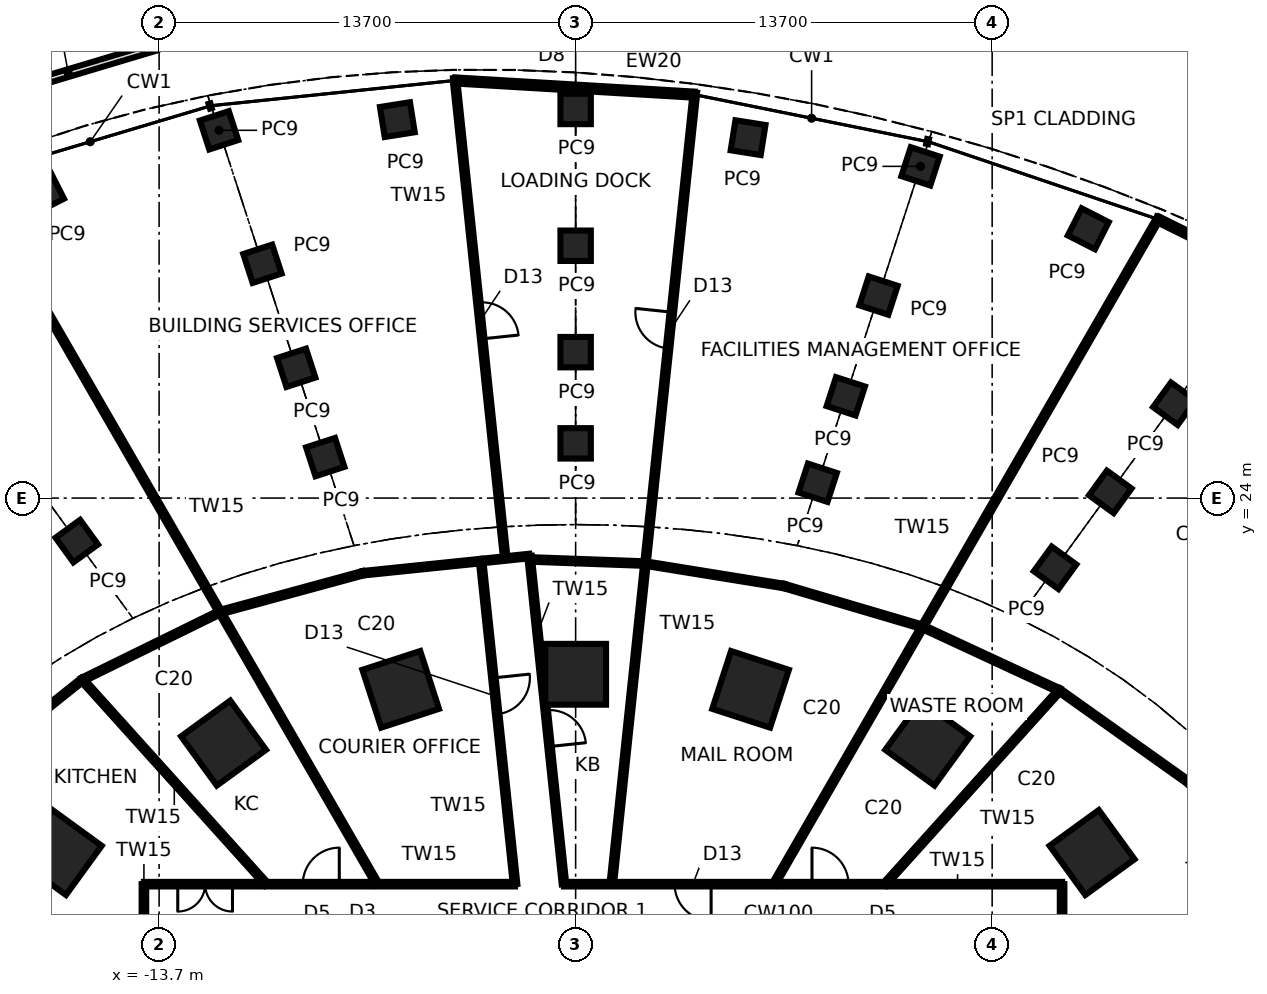
"""IFC4 building model, lengths in metres.
Left out: names, types, materials, properties, quantities, classifications, styles, units other than length and angle.
Written with IfcOpenShell. Run it as: python <this file> out.ifc"""

import sys

from ifc_helpers import new_model, si_unit, direction, frame, frame_2d, origin, origin_2d, place, context, subcontext, project, spatial, rectangle, extrude, element, fill, save


model = new_model("IFC4")
c1 = context("Model", 3, precision=1e-05, world=origin(), true_north=direction((0.0, 1.0)))
c2 = subcontext(c1, "Body", "Model", "MODEL_VIEW")
j1 = project(units=[si_unit("LENGTHUNIT", "METRE"), si_unit("PLANEANGLEUNIT", "RADIAN")], contexts=[c1])
p1 = place(None, origin())
s1 = spatial("IfcSite", under=j1, at=p1, CompositionType="ELEMENT")
p2 = place(p1, origin())
s2 = spatial("IfcBuilding", under=s1, at=p2, CompositionType="ELEMENT")
p3 = place(p2, origin())
s3 = spatial("IfcBuildingStorey", under=s2, at=p3, CompositionType="ELEMENT", Elevation=0.0)
for number, where, z_axis, x_axis in (
    (1, (16.986, 12.341, 0.0), (0.0, 0.0, 1.0), (0.809, 0.588, 0.0)),
    (2, (11.581, 15.94, 0.0), (0.0, 0.0, 1.0), (0.588, 0.809, 0.0)),
    (3, (5.754, 17.708, 0.0), (0.0, 0.0, 1.0), (0.309, 0.951, 0.0)),
    (4, (0.0, 18.204, 0.0), (0.0, 0.0, 1.0), (0.0, 1.0, 0.0)),
    (5, (-5.754, 17.708, 0.0), (0.0, 0.0, 1.0), (-0.309, 0.951, 0.0)),
    (6, (-11.581, 15.94, 0.0), (0.0, 0.0, 1.0), (-0.588, 0.809, 0.0)),
    (7, (-16.986, 12.341, 0.0), (0.0, 0.0, 1.0), (-0.809, 0.588, 0.0)),
):
    element("IfcColumn", number, at=place(p3, frame(where, z_axis=z_axis, x_axis=x_axis)), inside=s3, PredefinedType="COLUMN", context=c2, shape_type="SweptSolid", body=[
        extrude(rectangle(XDim=2.0, YDim=2.0, at=origin_2d()), origin(), (0.0, 0.0, 1.0), 5.6),
    ])
for number, where, z_axis, x_axis in (
    (8, (16.862, 32.857, 0.0), (0.0, 0.0, 1.0), (0.454, 0.891, 0.0)),
    (9, (11.344, 34.911, 0.0), (0.0, 0.0, 1.0), (0.309, 0.951, 0.0)),
    (10, (5.672, 35.856, 0.0), (0.0, 0.0, 1.0), (0.156, 0.988, 0.0)),
    (11, (0.0, 36.8, 0.0), (0.0, 0.0, 1.0), (0.0, 1.0, 0.0)),
    (12, (-5.864, 36.449, 0.0), (0.0, 0.0, 1.0), (-0.156, 0.988, 0.0)),
    (13, (-11.729, 36.097, 0.0), (0.0, 0.0, 1.0), (-0.309, 0.951, 0.0)),
    (14, (-17.502, 34.066, 0.0), (0.0, 0.0, 1.0), (-0.454, 0.891, 0.0)),
    (15, (19.692, 27.103, 0.0), (0.0, 0.0, 1.0), (0.588, 0.809, 0.0)),
    (16, (9.962, 30.66, 0.0), (0.0, 0.0, 1.0), (0.309, 0.951, 0.0)),
    (17, (0.0, 32.3, 0.0), (0.0, 0.0, 1.0), (0.0, 1.0, 0.0)),
    (18, (-10.302, 31.706, 0.0), (0.0, 0.0, 1.0), (-0.309, 0.951, 0.0)),
    (19, (17.585, 24.204, 0.0), (0.0, 0.0, 1.0), (0.588, 0.809, 0.0)),
    (20, (8.886, 27.347, 0.0), (0.0, 0.0, 1.0), (0.309, 0.951, 0.0)),
    (21, (0.0, 28.8, 0.0), (0.0, 0.0, 1.0), (0.0, 1.0, 0.0)),
    (22, (-9.19, 28.285, 0.0), (0.0, 0.0, 1.0), (-0.309, 0.951, 0.0)),
    (23, (15.77, 21.705, 0.0), (0.0, 0.0, 1.0), (0.588, 0.809, 0.0)),
    (24, (7.962, 24.504, 0.0), (0.0, 0.0, 1.0), (0.309, 0.951, 0.0)),
    (25, (0.0, 25.8, 0.0), (0.0, 0.0, 1.0), (0.0, 1.0, 0.0)),
    (26, (-8.236, 25.347, 0.0), (0.0, 0.0, 1.0), (-0.309, 0.951, 0.0)),
    (27, (-16.409, 22.584, 0.0), (0.0, 0.0, 1.0), (-0.588, 0.809, 0.0)),
):
    element("IfcColumn", number, at=place(p3, frame(where, z_axis=z_axis, x_axis=x_axis)), inside=s3, PredefinedType="COLUMN", context=c2, shape_type="SweptSolid", body=[
        extrude(rectangle(XDim=1.0, YDim=1.0, at=origin_2d()), origin(), (0.0, 0.0, 1.0), 5.6),
    ])
p4 = place(p3, frame((26.562, 29.5, 0.0), z_axis=(0.0, 0.0, 1.0), x_axis=(-0.896091912652, 0.443868543693, 0.0)))
e28 = element("IfcWall", 28, at=p4, inside=s3, PredefinedType="SOLIDWALL", context=c2, shape_type="SweptSolid", body=[
    extrude(rectangle(XDim=8.27, YDim=0.2, at=frame_2d((4.135, 0.0))), origin(), (0.0, 0.0, 1.0), 5.4),
])
p5 = place(p4, frame((0.4, 0.0, 0.0)))
e29 = element("IfcOpeningElement", 29, at=p5, cuts=e28, PredefinedType="OPENING", context=c2, shape_type="SweptSolid", body=[
    extrude(rectangle(XDim=1.8, YDim=2.7, at=frame_2d((0.9, 1.35))), frame((0.0, 0.11, 0.0), z_axis=(0.0, -1.0, 0.0), x_axis=(1.0, 0.0, 0.0)), (0.0, 0.0, 1.0), 0.22),
])
p6 = place(p3, frame((3.917, 37.269, 0.0), z_axis=(0.0, 0.0, 1.0), x_axis=(-0.998244288685, 0.059231242672, 0.0)))
e30 = element("IfcWall", 30, at=p6, inside=s3, PredefinedType="SOLIDWALL", context=c2, shape_type="SweptSolid", body=[
    extrude(rectangle(XDim=7.897, YDim=0.2, at=frame_2d((3.949, 0.0))), origin(), (0.0, 0.0, 1.0), 5.4),
])
p7 = place(p6, frame((2.972, 0.0, 0.0)))
e31 = element("IfcOpeningElement", 31, at=p7, cuts=e30, PredefinedType="OPENING", context=c2, shape_type="SweptSolid", body=[
    extrude(rectangle(XDim=3.6, YDim=4.0, at=frame_2d((1.8, 2.0))), frame((0.0, 0.11, 0.0), z_axis=(0.0, -1.0, 0.0), x_axis=(1.0, 0.0, 0.0)), (0.0, 0.0, 1.0), 0.22),
])
p8 = place(p3, frame((-13.814, 38.839, -0.15), z_axis=(0.0, 0.0, 1.0), x_axis=(-0.958018696907, -0.286705731329, 0.0)))
e32 = element("IfcWall", 32, at=p8, inside=s3, PredefinedType="SOLIDWALL", context=c2, shape_type="SweptSolid", body=[
    extrude(rectangle(XDim=6.0, YDim=0.25, at=frame_2d((3.0, 0.0))), origin(), (0.0, 0.0, 1.0), 0.6),
])
p9 = place(p3, frame((-14.237, 40.252, -0.15), z_axis=(0.0, 0.0, 1.0), x_axis=(-0.958018696907, -0.286705731329, 0.0)))
e33 = element("IfcWall", 33, at=p9, inside=s3, PredefinedType="SOLIDWALL", context=c2, shape_type="SweptSolid", body=[
    extrude(rectangle(XDim=6.0, YDim=0.4, at=frame_2d((3.0, 0.0))), origin(), (0.0, 0.0, 1.0), 0.6),
])
p10 = place(p3, frame((16.0, 3.401, 0.0), z_axis=(0.0, 0.0, 1.0), x_axis=(0.0, 1.0, 0.0)))
e34 = element("IfcWall", 34, at=p10, inside=s3, PredefinedType="PARTITIONING", context=c2, shape_type="SweptSolid", body=[
    extrude(rectangle(XDim=7.899, YDim=0.15, at=frame_2d((3.95, 0.0))), origin(), (0.0, 0.0, 1.0), 5.4),
])
p11 = place(p10, frame((3.375, 0.0, 0.0)))
e35 = element("IfcOpeningElement", 35, at=p11, cuts=e34, PredefinedType="OPENING", context=c2, shape_type="SweptSolid", body=[
    extrude(rectangle(XDim=1.2, YDim=2.4, at=frame_2d((0.6, 1.2))), frame((0.0, 0.085, 0.0), z_axis=(0.0, -1.0, 0.0), x_axis=(1.0, 0.0, 0.0)), (0.0, 0.0, 1.0), 0.17),
])
p12 = place(p3, frame((23.76, 10.579, 0.0), z_axis=(0.0, 0.0, 1.0), x_axis=(-0.661972392396, 0.749528219419, 0.0)))
e36 = element("IfcWall", 36, at=p12, inside=s3, PredefinedType="PARTITIONING", context=c2, shape_type="SweptSolid", body=[
    extrude(rectangle(XDim=5.432, YDim=0.15, at=frame_2d((2.716, 0.0))), origin(), (0.0, 0.0, 1.0), 5.4),
])
p13 = place(p3, frame((20.164, 14.65, 0.0), z_axis=(0.0, 0.0, 1.0), x_axis=(-0.81494599189, 0.579536910215, 0.0)))
e37 = element("IfcWall", 37, at=p13, inside=s3, PredefinedType="PARTITIONING", context=c2, shape_type="SweptSolid", body=[
    extrude(rectangle(XDim=5.217, YDim=0.15, at=frame_2d((2.608, 0.0))), origin(), (0.0, 0.0, 1.0), 5.4),
])
p14 = place(p3, frame((10.175, 11.3, 0.0), z_axis=(0.0, 0.0, 1.0), x_axis=(0.669128292476, 0.7431469089, 0.0)))
e38 = element("IfcWall", 38, at=p14, inside=s3, PredefinedType="PARTITIONING", context=c2, shape_type="SweptSolid", body=[
    extrude(rectangle(XDim=8.576, YDim=0.15, at=frame_2d((4.288, 0.0))), origin(), (0.0, 0.0, 1.0), 5.4),
])
p15 = place(p3, frame((15.913, 17.673, 0.0), z_axis=(0.0, 0.0, 1.0), x_axis=(-0.907108234971, 0.420897434119, 0.0)))
e39 = element("IfcWall", 39, at=p15, inside=s3, PredefinedType="PARTITIONING", context=c2, shape_type="SweptSolid", body=[
    extrude(rectangle(XDim=4.964, YDim=0.15, at=frame_2d((2.482, 0.0))), origin(), (0.0, 0.0, 1.0), 5.4),
])
p16 = place(p3, frame((16.0, 11.3, 0.0), z_axis=(0.0, 0.0, 1.0), x_axis=(-1.0, 0.0, 0.0)))
e40 = element("IfcWall", 40, at=p16, inside=s3, PredefinedType="PARTITIONING", context=c2, shape_type="SweptSolid", body=[
    extrude(rectangle(XDim=16.383, YDim=0.15, at=frame_2d((8.192, 0.0))), origin(), (0.0, 0.0, 1.0), 5.4),
])
p17 = place(p16, frame((7.026, 0.0, 0.0)))
e41 = element("IfcOpeningElement", 41, at=p17, cuts=e40, PredefinedType="OPENING", context=c2, shape_type="SweptSolid", body=[
    extrude(rectangle(XDim=1.2, YDim=2.4, at=frame_2d((0.6, 1.2))), frame((0.0, 0.085, 0.0), z_axis=(0.0, -1.0, 0.0), x_axis=(1.0, 0.0, 0.0)), (0.0, 0.0, 1.0), 0.17),
])
p18 = place(p16, frame((11.544, 0.0, 0.0)))
e42 = element("IfcOpeningElement", 42, at=p18, cuts=e40, PredefinedType="OPENING", context=c2, shape_type="SweptSolid", body=[
    extrude(rectangle(XDim=1.2, YDim=2.4, at=frame_2d((0.6, 1.2))), frame((0.0, 0.085, 0.0), z_axis=(0.0, -1.0, 0.0), x_axis=(1.0, 0.0, 0.0)), (0.0, 0.0, 1.0), 0.17),
])
p19 = place(p3, frame((6.524, 11.3, 0.0), z_axis=(0.0, 0.0, 1.0), x_axis=(0.499998368249, 0.866026345874, 0.0)))
e43 = element("IfcWall", 43, at=p19, inside=s3, PredefinedType="PARTITIONING", context=c2, shape_type="SweptSolid", body=[
    extrude(rectangle(XDim=25.174, YDim=0.15, at=frame_2d((12.587, 0.0))), origin(), (0.0, 0.0, 1.0), 5.4),
])
p20 = place(p3, frame((11.41, 19.762, 0.0), z_axis=(0.0, 0.0, 1.0), x_axis=(-0.959084076189, 0.283121413534, 0.0)))
e44 = element("IfcWall", 44, at=p20, inside=s3, PredefinedType="PARTITIONING", context=c2, shape_type="SweptSolid", body=[
    extrude(rectangle(XDim=4.746, YDim=0.15, at=frame_2d((2.373, 0.0))), origin(), (0.0, 0.0, 1.0), 5.4),
])
p21 = place(p3, frame((6.858, 21.106, 0.0), z_axis=(0.0, 0.0, 1.0), x_axis=(-0.98714853178, 0.159805432336, 0.0)))
e45 = element("IfcWall", 45, at=p21, inside=s3, PredefinedType="PARTITIONING", context=c2, shape_type="SweptSolid", body=[
    extrude(rectangle(XDim=4.621, YDim=0.15, at=frame_2d((2.311, 0.0))), origin(), (0.0, 0.0, 1.0), 5.4),
])
p22 = place(p3, frame((1.188, 11.3, 0.0), z_axis=(0.0, 0.0, 1.0), x_axis=(0.104522215703, 0.994522551994, 0.0)))
e46 = element("IfcWall", 46, at=p22, inside=s3, PredefinedType="PARTITIONING", context=c2, shape_type="SweptSolid", body=[
    extrude(rectangle(XDim=26.032, YDim=0.15, at=frame_2d((13.016, 0.0))), origin(), (0.0, 0.0, 1.0), 5.4),
])
p23 = place(p22, frame((17.718, 0.0, 0.0)))
e47 = element("IfcOpeningElement", 47, at=p23, cuts=e46, PredefinedType="OPENING", context=c2, shape_type="SweptSolid", body=[
    extrude(rectangle(XDim=1.2, YDim=2.4, at=frame_2d((0.6, 1.2))), frame((0.0, 0.085, 0.0), z_axis=(0.0, -1.0, 0.0), x_axis=(1.0, 0.0, 0.0)), (0.0, 0.0, 1.0), 0.17),
])
p24 = place(p3, frame((2.296, 21.845, 0.0), z_axis=(0.0, 0.0, 1.0), x_axis=(-0.999349376357, 0.036066937421, 0.0)))
e48 = element("IfcWall", 48, at=p24, inside=s3, PredefinedType="PARTITIONING", context=c2, shape_type="SweptSolid", body=[
    extrude(rectangle(XDim=3.804, YDim=0.15, at=frame_2d((1.902, 0.0))), origin(), (0.0, 0.0, 1.0), 5.4),
])
p25 = place(p3, frame((-0.383, 11.3, 0.0), z_axis=(0.0, 0.0, 1.0), x_axis=(-0.104514398363, 0.994523373549, 0.0)))
e49 = element("IfcWall", 49, at=p25, inside=s3, PredefinedType="PARTITIONING", context=c2, shape_type="SweptSolid", body=[
    extrude(rectangle(XDim=10.741, YDim=0.15, at=frame_2d((5.37, 0.0))), origin(), (0.0, 0.0, 1.0), 5.4),
])
p26 = place(p25, frame((4.552, 0.0, 0.0)))
e50 = element("IfcOpeningElement", 50, at=p26, cuts=e49, PredefinedType="OPENING", context=c2, shape_type="SweptSolid", body=[
    extrude(rectangle(XDim=1.2, YDim=2.4, at=frame_2d((0.6, 1.2))), frame((0.0, 0.085, 0.0), z_axis=(0.0, -1.0, 0.0), x_axis=(1.0, 0.0, 0.0)), (0.0, 0.0, 1.0), 0.17),
])
p27 = place(p3, frame((-1.506, 21.982, 0.0), z_axis=(0.0, 0.0, 1.0), x_axis=(-0.105469062013, 0.994422584698, 0.0)))
e51 = element("IfcWall", 51, at=p27, inside=s3, PredefinedType="PARTITIONING", context=c2, shape_type="SweptSolid", body=[
    extrude(rectangle(XDim=0.114, YDim=0.15, at=frame_2d((0.057, 0.0))), origin(), (0.0, 0.0, 1.0), 5.4),
])
p28 = place(p3, frame((-1.518, 22.095, 0.0), z_axis=(0.0, 0.0, 1.0), x_axis=(-0.994522996201, -0.104517989015, 0.0)))
e52 = element("IfcWall", 52, at=p28, inside=s3, PredefinedType="PARTITIONING", context=c2, shape_type="SweptSolid", body=[
    extrude(rectangle(XDim=1.6, YDim=0.15, at=frame_2d((0.8, 0.0))), origin(), (0.0, 0.0, 1.0), 5.4),
])
p29 = place(p3, frame((-2.313, 22.011, 0.0), z_axis=(0.0, 0.0, 1.0), x_axis=(-0.104529687623, 0.994521766683, 0.0)))
e53 = element("IfcWall", 53, at=p29, inside=s3, PredefinedType="PARTITIONING", context=c2, shape_type="SweptSolid", body=[
    extrude(rectangle(XDim=15.733, YDim=0.15, at=frame_2d((7.866, 0.0))), origin(), (0.0, 0.0, 1.0), 5.4),
])
p30 = place(p29, frame((7.266, 0.0, 0.0)))
e54 = element("IfcOpeningElement", 54, at=p30, cuts=e53, PredefinedType="OPENING", context=c2, shape_type="SweptSolid", body=[
    extrude(rectangle(XDim=1.2, YDim=2.4, at=frame_2d((0.6, 1.2))), frame((0.0, 0.085, 0.0), z_axis=(0.0, -1.0, 0.0), x_axis=(1.0, 0.0, 0.0)), (0.0, 0.0, 1.0), 0.17),
])
p31 = place(p3, frame((-3.109, 21.927, 0.0), z_axis=(0.0, 0.0, 1.0), x_axis=(0.104524229431, -0.994522340353, 0.0)))
e55 = element("IfcWall", 55, at=p31, inside=s3, PredefinedType="PARTITIONING", context=c2, shape_type="SweptSolid", body=[
    extrude(rectangle(XDim=10.686, YDim=0.15, at=frame_2d((5.343, 0.0))), origin(), (0.0, 0.0, 1.0), 5.4),
])
p32 = place(p31, frame((3.864, 0.0, 0.0)))
e56 = element("IfcOpeningElement", 56, at=p32, cuts=e55, PredefinedType="OPENING", context=c2, shape_type="SweptSolid", body=[
    extrude(rectangle(XDim=1.2, YDim=2.4, at=frame_2d((0.6, 1.2))), frame((0.0, 0.085, 0.0), z_axis=(0.0, -1.0, 0.0), x_axis=(1.0, 0.0, 0.0)), (0.0, 0.0, 1.0), 0.17),
])
p33 = place(p3, frame((-3.109, 21.929, 0.0), z_axis=(0.0, 0.0, 1.0), x_axis=(-0.994719772575, -0.102628329662, 0.0)))
e57 = element("IfcWall", 57, at=p33, inside=s3, PredefinedType="PARTITIONING", context=c2, shape_type="SweptSolid", body=[
    extrude(rectangle(XDim=3.906, YDim=0.15, at=frame_2d((1.953, 0.0))), origin(), (0.0, 0.0, 1.0), 5.4),
])
p34 = place(p3, frame((-6.995, 21.528, 0.0), z_axis=(0.0, 0.0, 1.0), x_axis=(-0.964877176163, -0.26270141781, 0.0)))
e58 = element("IfcWall", 58, at=p34, inside=s3, PredefinedType="PARTITIONING", context=c2, shape_type="SweptSolid", body=[
    extrude(rectangle(XDim=4.867, YDim=0.15, at=frame_2d((2.434, 0.0))), origin(), (0.0, 0.0, 1.0), 5.4),
])
p35 = place(p3, frame((-6.524, 11.3, 0.0), z_axis=(0.0, 0.0, 1.0), x_axis=(-0.499999476762, 0.866025705876, 0.0)))
e59 = element("IfcWall", 59, at=p35, inside=s3, PredefinedType="PARTITIONING", context=c2, shape_type="SweptSolid", body=[
    extrude(rectangle(XDim=26.751, YDim=0.15, at=frame_2d((13.376, 0.0))), origin(), (0.0, 0.0, 1.0), 5.4),
])
p36 = place(p3, frame((-1.992, 11.3, 0.0), z_axis=(0.0, 0.0, 1.0), x_axis=(-1.0, 0.0, 0.0)))
e60 = element("IfcWall", 60, at=p36, inside=s3, PredefinedType="PARTITIONING", context=c2, shape_type="SweptSolid", body=[
    extrude(rectangle(XDim=12.208, YDim=0.15, at=frame_2d((6.104, 0.0))), origin(), (0.0, 0.0, 1.0), 5.4),
])
p37 = place(p36, frame((5.782, 0.0, 0.0)))
e61 = element("IfcOpeningElement", 61, at=p37, cuts=e60, PredefinedType="OPENING", context=c2, shape_type="SweptSolid", body=[
    extrude(rectangle(XDim=1.2, YDim=2.4, at=frame_2d((0.6, 1.2))), frame((0.0, 0.085, 0.0), z_axis=(0.0, -1.0, 0.0), x_axis=(1.0, 0.0, 0.0)), (0.0, 0.0, 1.0), 0.17),
])
p38 = place(p36, frame((9.295, 0.0, 0.0)))
e62 = element("IfcOpeningElement", 62, at=p38, cuts=e60, PredefinedType="OPENING", context=c2, shape_type="SweptSolid", body=[
    extrude(rectangle(XDim=1.8, YDim=2.4, at=frame_2d((0.9, 1.2))), frame((0.0, 0.085, 0.0), z_axis=(0.0, -1.0, 0.0), x_axis=(1.0, 0.0, 0.0)), (0.0, 0.0, 1.0), 0.17),
])
p39 = place(p3, frame((-11.691, 20.25, 0.0), z_axis=(0.0, 0.0, 1.0), x_axis=(-0.897697488604, -0.440612322744, 0.0)))
e63 = element("IfcWall", 63, at=p39, inside=s3, PredefinedType="PARTITIONING", context=c2, shape_type="SweptSolid", body=[
    extrude(rectangle(XDim=5.054, YDim=0.15, at=frame_2d((2.527, 0.0))), origin(), (0.0, 0.0, 1.0), 5.4),
])
p40 = place(p3, frame((-10.175, 11.3, 0.0), z_axis=(0.0, 0.0, 1.0), x_axis=(-0.669137674556, 0.743138461183, 0.0)))
e64 = element("IfcWall", 64, at=p40, inside=s3, PredefinedType="PARTITIONING", context=c2, shape_type="SweptSolid", body=[
    extrude(rectangle(XDim=9.046, YDim=0.15, at=frame_2d((4.523, 0.0))), origin(), (0.0, 0.0, 1.0), 5.4),
])
p41 = place(p3, frame((-16.228, 18.023, 0.0), z_axis=(0.0, 0.0, 1.0), x_axis=(-0.781542390833, -0.623852138997, 0.0)))
e65 = element("IfcWall", 65, at=p41, inside=s3, PredefinedType="PARTITIONING", context=c2, shape_type="SweptSolid", body=[
    extrude(rectangle(XDim=5.23, YDim=0.15, at=frame_2d((2.615, 0.0))), origin(), (0.0, 0.0, 1.0), 5.4),
])
p42 = place(p3, frame((-14.2, 11.3, 0.0), z_axis=(0.0, 0.0, 1.0), x_axis=(0.0, -1.0, 0.0)))
e66 = element("IfcWall", 66, at=p42, inside=s3, PredefinedType="PARTITIONING", context=c2, shape_type="SweptSolid", body=[
    extrude(rectangle(XDim=1.8, YDim=0.15, at=frame_2d((0.9, 0.0))), origin(), (0.0, 0.0, 1.0), 5.4),
])
p43 = place(p3, frame((-14.2, 7.8, 0.0), z_axis=(0.0, 0.0, 1.0), x_axis=(-0.961010848489, 0.27651066722, 0.0)))
e67 = element("IfcWall", 67, at=p43, inside=s3, PredefinedType="SOLIDWALL", context=c2, shape_type="SweptSolid", body=[
    extrude(rectangle(XDim=9.763, YDim=0.19, at=frame_2d((4.882, 0.0))), origin(), (0.0, 0.0, 1.0), 5.4),
])
p44 = place(p7, origin())
e68 = element("IfcDoor", 68, at=p44, inside=s3, OperationType="ROLLINGUP", PredefinedType="DOOR", context=c2, shape_type="SweptSolid", body=[
    extrude(rectangle(XDim=3.6, YDim=4.0, at=frame_2d((1.8, 2.0))), frame((0.0, 0.025, 0.0), z_axis=(0.0, -1.0, 0.0), x_axis=(1.0, 0.0, 0.0)), (0.0, 0.0, 1.0), 0.05),
])
fill(e31, e68)
p45 = place(p23, origin())
e69 = element("IfcDoor", 69, at=p45, inside=s3, OperationType="SINGLE_SWING_RIGHT", PredefinedType="DOOR", context=c2, shape_type="SweptSolid", body=[
    extrude(rectangle(XDim=1.2, YDim=2.4, at=frame_2d((0.6, 1.2))), frame((0.0, 0.025, 0.0), z_axis=(0.0, -1.0, 0.0), x_axis=(1.0, 0.0, 0.0)), (0.0, 0.0, 1.0), 0.05),
])
fill(e47, e69)
p46 = place(p30, frame((1.2, 0.0, 0.0), z_axis=(0.0, 0.0, 1.0), x_axis=(-1.0, 0.0, 0.0)))
e70 = element("IfcDoor", 70, at=p46, inside=s3, OperationType="SINGLE_SWING_RIGHT", PredefinedType="DOOR", context=c2, shape_type="SweptSolid", body=[
    extrude(rectangle(XDim=1.2, YDim=2.4, at=frame_2d((0.6, 1.2))), frame((0.0, 0.025, 0.0), z_axis=(0.0, -1.0, 0.0), x_axis=(1.0, 0.0, 0.0)), (0.0, 0.0, 1.0), 0.05),
])
fill(e54, e70)
p47 = place(p17, frame((1.2, 0.0, 0.0), z_axis=(0.0, 0.0, 1.0), x_axis=(-1.0, 0.0, 0.0)))
e71 = element("IfcDoor", 71, at=p47, inside=s3, OperationType="SINGLE_SWING_LEFT", PredefinedType="DOOR", context=c2, shape_type="SweptSolid", body=[
    extrude(rectangle(XDim=1.2, YDim=2.4, at=frame_2d((0.6, 1.2))), frame((0.0, 0.025, 0.0), z_axis=(0.0, -1.0, 0.0), x_axis=(1.0, 0.0, 0.0)), (0.0, 0.0, 1.0), 0.05),
])
fill(e41, e71)
p48 = place(p18, origin())
e72 = element("IfcDoor", 72, at=p48, inside=s3, OperationType="SINGLE_SWING_LEFT", PredefinedType="DOOR", context=c2, shape_type="SweptSolid", body=[
    extrude(rectangle(XDim=1.2, YDim=2.4, at=frame_2d((0.6, 1.2))), frame((0.0, 0.025, 0.0), z_axis=(0.0, -1.0, 0.0), x_axis=(1.0, 0.0, 0.0)), (0.0, 0.0, 1.0), 0.05),
])
fill(e42, e72)
p49 = place(p26, frame((1.2, 0.0, 0.0), z_axis=(0.0, 0.0, 1.0), x_axis=(-1.0, 0.0, 0.0)))
e73 = element("IfcDoor", 73, at=p49, inside=s3, OperationType="SINGLE_SWING_RIGHT", PredefinedType="DOOR", context=c2, shape_type="SweptSolid", body=[
    extrude(rectangle(XDim=1.2, YDim=2.4, at=frame_2d((0.6, 1.2))), frame((0.0, 0.025, 0.0), z_axis=(0.0, -1.0, 0.0), x_axis=(1.0, 0.0, 0.0)), (0.0, 0.0, 1.0), 0.05),
])
fill(e50, e73)
p50 = place(p32, origin())
e74 = element("IfcDoor", 74, at=p50, inside=s3, OperationType="SINGLE_SWING_LEFT", PredefinedType="DOOR", context=c2, shape_type="SweptSolid", body=[
    extrude(rectangle(XDim=1.2, YDim=2.4, at=frame_2d((0.6, 1.2))), frame((0.0, 0.025, 0.0), z_axis=(0.0, -1.0, 0.0), x_axis=(1.0, 0.0, 0.0)), (0.0, 0.0, 1.0), 0.05),
])
fill(e56, e74)
p51 = place(p37, frame((1.2, 0.0, 0.0), z_axis=(0.0, 0.0, 1.0), x_axis=(-1.0, 0.0, 0.0)))
e75 = element("IfcDoor", 75, at=p51, inside=s3, OperationType="SINGLE_SWING_RIGHT", PredefinedType="DOOR", context=c2, shape_type="SweptSolid", body=[
    extrude(rectangle(XDim=1.2, YDim=2.4, at=frame_2d((0.6, 1.2))), frame((0.0, 0.025, 0.0), z_axis=(0.0, -1.0, 0.0), x_axis=(1.0, 0.0, 0.0)), (0.0, 0.0, 1.0), 0.05),
])
fill(e61, e75)
p52 = place(p38, origin())
e76 = element("IfcDoor", 76, at=p52, inside=s3, OperationType="DOUBLE_DOOR_SINGLE_SWING", PredefinedType="DOOR", context=c2, shape_type="SweptSolid", body=[
    extrude(rectangle(XDim=1.8, YDim=2.4, at=frame_2d((0.9, 1.2))), frame((0.0, 0.025, 0.0), z_axis=(0.0, -1.0, 0.0), x_axis=(1.0, 0.0, 0.0)), (0.0, 0.0, 1.0), 0.05),
])
fill(e62, e76)
save(model, sys.argv[1])
